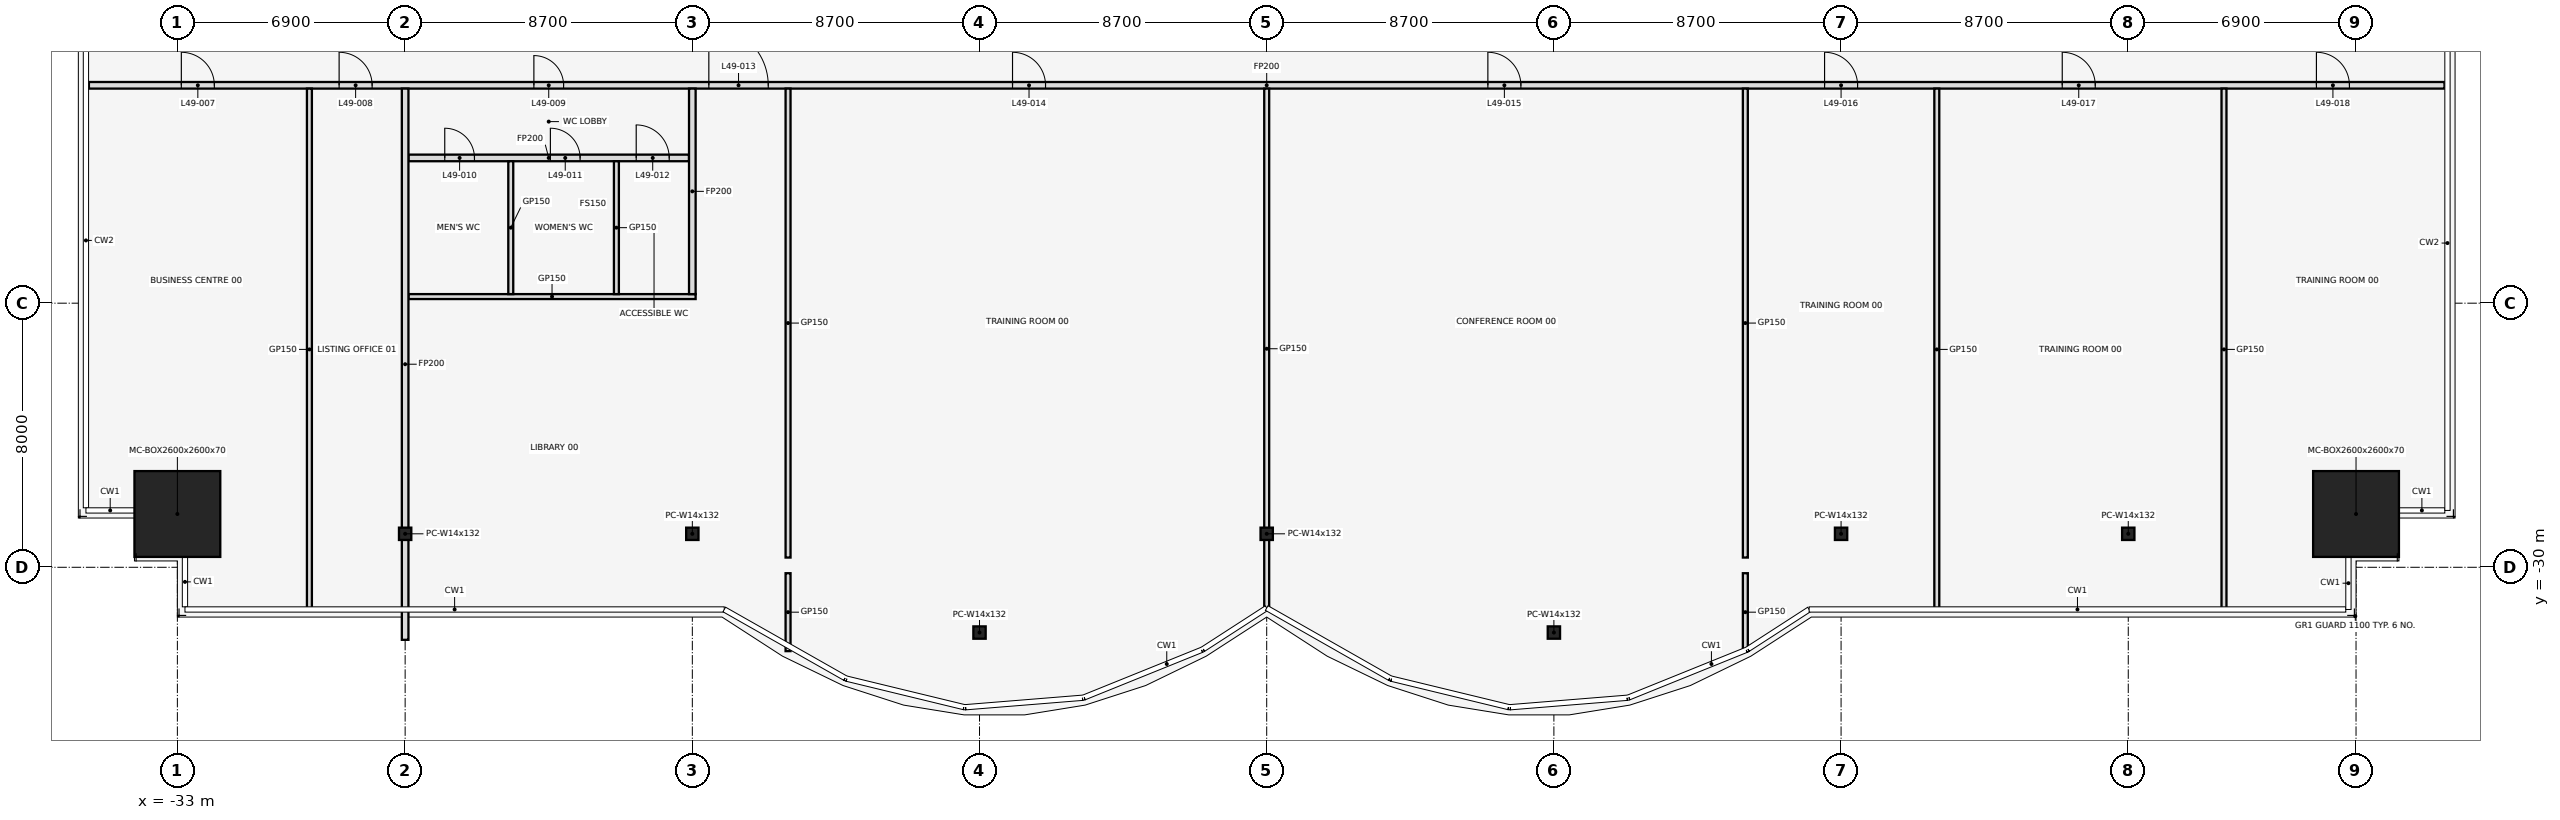
"""IFC4 building model, lengths in metres.
Left out: names, types, materials, properties, quantities, classifications, styles, units other than length and angle.
Written with IfcOpenShell. Run it as: python <this file> out.ifc"""

import sys

from ifc_helpers import new_model, si_unit, direction, frame, frame_2d, origin, origin_2d, place, context, subcontext, project, spatial, rectangle, hollow_rectangle, i_section, extrude, element, fill, save


model = new_model("IFC4")
c1 = context("Model", 3, precision=1e-05, world=origin(), true_north=direction((0.0, 1.0)))
c2 = subcontext(c1, "Body", "Model", "MODEL_VIEW")
j1 = project(units=[si_unit("LENGTHUNIT", "METRE"), si_unit("PLANEANGLEUNIT", "RADIAN")], contexts=[c1])
p1 = place(None, origin())
s1 = spatial("IfcSite", under=j1, at=p1, CompositionType="ELEMENT")
p2 = place(p1, origin())
s2 = spatial("IfcBuilding", under=s1, at=p2, CompositionType="ELEMENT")
p3 = place(p2, frame((0.0, 0.0, 219.6)))
s3 = spatial("IfcBuildingStorey", under=s2, at=p3, CompositionType="ELEMENT", Elevation=219.6)
p4 = place(p3, frame((-33.0, -28.386, 0.0), z_axis=(0.0, 0.0, 1.0), x_axis=(1.0, 0.0, 0.0)))
e1 = element("IfcColumn", 1, at=p4, inside=s3, PredefinedType="COLUMN", context=c2, shape_type="SweptSolid", body=[
    extrude(hollow_rectangle(XDim=2.6, YDim=2.6, WallThickness=0.07, at=origin_2d()), origin(), (0.0, 0.0, 1.0), 4.1),
])
for number, where, z_axis, x_axis in (
    (2, (-26.1, -28.986, 0.0), (0.0, 0.0, 1.0), (1.0, 0.0, 0.0)),
    (3, (-17.4, -28.986, 0.0), (0.0, 0.0, 1.0), (1.0, 0.0, 0.0)),
    (4, (-8.7, -31.977, 0.0), (0.0, 0.0, 1.0), (1.0, 0.0, 0.0)),
    (5, (0.0, -28.986, 0.0), (0.0, 0.0, 1.0), (1.0, 0.0, 0.0)),
    (6, (8.7, -31.977, 0.0), (0.0, 0.0, 1.0), (1.0, 0.0, 0.0)),
    (7, (17.4, -28.986, 0.0), (0.0, 0.0, 1.0), (1.0, 0.0, 0.0)),
    (8, (26.1, -28.986, 0.0), (0.0, 0.0, 1.0), (1.0, 0.0, 0.0)),
):
    element("IfcColumn", number, at=place(p3, frame(where, z_axis=z_axis, x_axis=x_axis)), inside=s3, PredefinedType="COLUMN", context=c2, shape_type="SweptSolid", body=[
        extrude(i_section(OverallWidth=0.373, OverallDepth=0.373, WebThickness=0.016, FlangeThickness=0.026, at=origin_2d()), origin(), (0.0, 0.0, 1.0), 4.1),
    ])
p5 = place(p3, frame((33.0, -28.386, 0.0), z_axis=(0.0, 0.0, 1.0), x_axis=(1.0, 0.0, 0.0)))
e9 = element("IfcColumn", 9, at=p5, inside=s3, PredefinedType="COLUMN", context=c2, shape_type="SweptSolid", body=[
    extrude(hollow_rectangle(XDim=2.6, YDim=2.6, WallThickness=0.07, at=origin_2d()), origin(), (0.0, 0.0, 1.0), 4.1),
])
p6 = place(p3, frame((-26.0, -21.8, 0.0), z_axis=(0.0, 0.0, 1.0), x_axis=(1.0, 0.0, 0.0)))
e10 = element("IfcWall", 10, at=p6, inside=s3, PredefinedType="PARTITIONING", context=c2, shape_type="SweptSolid", body=[
    extrude(rectangle(XDim=8.7, YDim=0.15, at=frame_2d((4.35, 0.0))), origin(), (0.0, 0.0, 1.0), 2.84),
])
p7 = place(p3, frame((-26.0, -17.6, 0.0), z_axis=(0.0, 0.0, 1.0), x_axis=(1.0, 0.0, 0.0)))
e11 = element("IfcWall", 11, at=p7, inside=s3, PredefinedType="PARTITIONING", context=c2, shape_type="SweptSolid", body=[
    extrude(rectangle(XDim=8.5, YDim=0.2, at=frame_2d((4.25, 0.0))), origin(), (0.0, 0.0, 1.0), 2.84),
])
p8 = place(p7, frame((1.1, 0.0, 0.0)))
e12 = element("IfcOpeningElement", 12, at=p8, cuts=e11, PredefinedType="OPENING", context=c2, shape_type="SweptSolid", body=[
    extrude(rectangle(XDim=0.9, YDim=2.1, at=frame_2d((0.45, 1.05))), frame((0.0, 0.112, 0.0), z_axis=(0.0, -1.0, 0.0), x_axis=(1.0, 0.0, 0.0)), (0.0, 0.0, 1.0), 0.224),
])
p9 = place(p7, frame((4.3, 0.0, 0.0)))
e13 = element("IfcOpeningElement", 13, at=p9, cuts=e11, PredefinedType="OPENING", context=c2, shape_type="SweptSolid", body=[
    extrude(rectangle(XDim=0.9, YDim=2.1, at=frame_2d((0.45, 1.05))), frame((0.0, 0.112, 0.0), z_axis=(0.0, -1.0, 0.0), x_axis=(1.0, 0.0, 0.0)), (0.0, 0.0, 1.0), 0.224),
])
p10 = place(p7, frame((6.9, 0.0, 0.0)))
e14 = element("IfcOpeningElement", 14, at=p10, cuts=e11, PredefinedType="OPENING", context=c2, shape_type="SweptSolid", body=[
    extrude(rectangle(XDim=1.0, YDim=2.1, at=frame_2d((0.5, 1.05))), frame((0.0, 0.112, 0.0), z_axis=(0.0, -1.0, 0.0), x_axis=(1.0, 0.0, 0.0)), (0.0, 0.0, 1.0), 0.224),
])
p11 = place(p3, frame((-35.68, -15.4, 0.0), z_axis=(0.0, 0.0, 1.0), x_axis=(1.0, 0.0, 0.0)))
e15 = element("IfcWall", 15, at=p11, inside=s3, PredefinedType="PARTITIONING", context=c2, shape_type="SweptSolid", body=[
    extrude(rectangle(XDim=71.36, YDim=0.2, at=frame_2d((35.68, 0.0))), origin(), (0.0, 0.0, 1.0), 2.84),
])
p12 = place(p11, frame((2.8, 0.0, 0.0)))
e16 = element("IfcOpeningElement", 16, at=p12, cuts=e15, PredefinedType="OPENING", context=c2, shape_type="SweptSolid", body=[
    extrude(rectangle(XDim=1.0, YDim=2.1, at=frame_2d((0.5, 1.05))), frame((0.0, 0.112, 0.0), z_axis=(0.0, -1.0, 0.0), x_axis=(1.0, 0.0, 0.0)), (0.0, 0.0, 1.0), 0.224),
])
p13 = place(p11, frame((7.58, 0.0, 0.0)))
e17 = element("IfcOpeningElement", 17, at=p13, cuts=e15, PredefinedType="OPENING", context=c2, shape_type="SweptSolid", body=[
    extrude(rectangle(XDim=1.0, YDim=2.1, at=frame_2d((0.5, 1.05))), frame((0.0, 0.112, 0.0), z_axis=(0.0, -1.0, 0.0), x_axis=(1.0, 0.0, 0.0)), (0.0, 0.0, 1.0), 0.224),
])
p14 = place(p11, frame((13.48, 0.0, 0.0)))
e18 = element("IfcOpeningElement", 18, at=p14, cuts=e15, PredefinedType="OPENING", context=c2, shape_type="SweptSolid", body=[
    extrude(rectangle(XDim=0.9, YDim=2.1, at=frame_2d((0.45, 1.05))), frame((0.0, 0.112, 0.0), z_axis=(0.0, -1.0, 0.0), x_axis=(1.0, 0.0, 0.0)), (0.0, 0.0, 1.0), 0.224),
])
p15 = place(p11, frame((18.78, 0.0, 0.0)))
e19 = element("IfcOpeningElement", 19, at=p15, cuts=e15, PredefinedType="OPENING", context=c2, shape_type="SweptSolid", body=[
    extrude(rectangle(XDim=1.8, YDim=2.1, at=frame_2d((0.9, 1.05))), frame((0.0, 0.112, 0.0), z_axis=(0.0, -1.0, 0.0), x_axis=(1.0, 0.0, 0.0)), (0.0, 0.0, 1.0), 0.224),
])
p16 = place(p11, frame((27.98, 0.0, 0.0)))
e20 = element("IfcOpeningElement", 20, at=p16, cuts=e15, PredefinedType="OPENING", context=c2, shape_type="SweptSolid", body=[
    extrude(rectangle(XDim=1.0, YDim=2.1, at=frame_2d((0.5, 1.05))), frame((0.0, 0.112, 0.0), z_axis=(0.0, -1.0, 0.0), x_axis=(1.0, 0.0, 0.0)), (0.0, 0.0, 1.0), 0.224),
])
p17 = place(p11, frame((42.38, 0.0, 0.0)))
e21 = element("IfcOpeningElement", 21, at=p17, cuts=e15, PredefinedType="OPENING", context=c2, shape_type="SweptSolid", body=[
    extrude(rectangle(XDim=1.0, YDim=2.1, at=frame_2d((0.5, 1.05))), frame((0.0, 0.112, 0.0), z_axis=(0.0, -1.0, 0.0), x_axis=(1.0, 0.0, 0.0)), (0.0, 0.0, 1.0), 0.224),
])
p18 = place(p11, frame((52.58, 0.0, 0.0)))
e22 = element("IfcOpeningElement", 22, at=p18, cuts=e15, PredefinedType="OPENING", context=c2, shape_type="SweptSolid", body=[
    extrude(rectangle(XDim=1.0, YDim=2.1, at=frame_2d((0.5, 1.05))), frame((0.0, 0.112, 0.0), z_axis=(0.0, -1.0, 0.0), x_axis=(1.0, 0.0, 0.0)), (0.0, 0.0, 1.0), 0.224),
])
p19 = place(p11, frame((59.78, 0.0, 0.0)))
e23 = element("IfcOpeningElement", 23, at=p19, cuts=e15, PredefinedType="OPENING", context=c2, shape_type="SweptSolid", body=[
    extrude(rectangle(XDim=1.0, YDim=2.1, at=frame_2d((0.5, 1.05))), frame((0.0, 0.112, 0.0), z_axis=(0.0, -1.0, 0.0), x_axis=(1.0, 0.0, 0.0)), (0.0, 0.0, 1.0), 0.224),
])
p20 = place(p11, frame((67.48, 0.0, 0.0)))
e24 = element("IfcOpeningElement", 24, at=p20, cuts=e15, PredefinedType="OPENING", context=c2, shape_type="SweptSolid", body=[
    extrude(rectangle(XDim=1.0, YDim=2.1, at=frame_2d((0.5, 1.05))), frame((0.0, 0.112, 0.0), z_axis=(0.0, -1.0, 0.0), x_axis=(1.0, 0.0, 0.0)), (0.0, 0.0, 1.0), 0.224),
])
p21 = place(p3, frame((-29.0, -31.3, 0.0), z_axis=(0.0, 0.0, 1.0), x_axis=(0.0, 1.0, 0.0)))
e25 = element("IfcWall", 25, at=p21, inside=s3, PredefinedType="PARTITIONING", context=c2, shape_type="SweptSolid", body=[
    extrude(rectangle(XDim=15.8, YDim=0.15, at=frame_2d((7.9, 0.0))), origin(), (0.0, 0.0, 1.0), 2.84),
])
p22 = place(p3, frame((-26.1, -32.198, 0.0), z_axis=(0.0, 0.0, 1.0), x_axis=(0.0, 1.0, 0.0)))
e26 = element("IfcWall", 26, at=p22, inside=s3, PredefinedType="PARTITIONING", context=c2, shape_type="SweptSolid", body=[
    extrude(rectangle(XDim=16.698, YDim=0.2, at=frame_2d((8.349, 0.0))), origin(), (0.0, 0.0, 1.0), 2.84),
])
for number, where, z_axis, x_axis in (
    (27, (-22.9, -21.725, 0.0), (0.0, 0.0, 1.0), (0.0, 1.0, 0.0)),
    (28, (-19.7, -21.725, 0.0), (0.0, 0.0, 1.0), (0.0, 1.0, 0.0)),
):
    element("IfcWall", number, at=place(p3, frame(where, z_axis=z_axis, x_axis=x_axis)), inside=s3, PredefinedType="PARTITIONING", context=c2, shape_type="SweptSolid", body=[
        extrude(rectangle(XDim=4.025, YDim=0.15, at=frame_2d((2.013, 0.0))), origin(), (0.0, 0.0, 1.0), 2.84),
    ])
p23 = place(p3, frame((-17.4, -21.725, 0.0), z_axis=(0.0, 0.0, 1.0), x_axis=(0.0, 1.0, 0.0)))
e29 = element("IfcWall", 29, at=p23, inside=s3, PredefinedType="PARTITIONING", context=c2, shape_type="SweptSolid", body=[
    extrude(rectangle(XDim=6.225, YDim=0.2, at=frame_2d((3.113, 0.0))), origin(), (0.0, 0.0, 1.0), 2.84),
])
p24 = place(p3, frame((-14.5, -32.54, 0.0), z_axis=(0.0, 0.0, 1.0), x_axis=(0.0, 1.0, 0.0)))
e30 = element("IfcWall", 30, at=p24, inside=s3, PredefinedType="PARTITIONING", context=c2, shape_type="SweptSolid", body=[
    extrude(rectangle(XDim=2.36, YDim=0.15, at=frame_2d((1.18, 0.0))), origin(), (0.0, 0.0, 1.0), 2.84),
])
p25 = place(p3, frame((-14.5, -29.705, 0.0), z_axis=(0.0, 0.0, 1.0), x_axis=(0.0, 1.0, 0.0)))
e31 = element("IfcWall", 31, at=p25, inside=s3, PredefinedType="PARTITIONING", context=c2, shape_type="SweptSolid", body=[
    extrude(rectangle(XDim=14.205, YDim=0.15, at=frame_2d((7.103, 0.0))), origin(), (0.0, 0.0, 1.0), 2.84),
])
p26 = place(p3, frame((0.0, -31.26, 0.0), z_axis=(0.0, 0.0, 1.0), x_axis=(0.0, 1.0, 0.0)))
e32 = element("IfcWall", 32, at=p26, inside=s3, PredefinedType="PARTITIONING", context=c2, shape_type="SweptSolid", body=[
    extrude(rectangle(XDim=15.76, YDim=0.15, at=frame_2d((7.88, 0.0))), origin(), (0.0, 0.0, 1.0), 2.84),
])
p27 = place(p3, frame((14.5, -32.54, 0.0), z_axis=(0.0, 0.0, 1.0), x_axis=(0.0, 1.0, 0.0)))
e33 = element("IfcWall", 33, at=p27, inside=s3, PredefinedType="PARTITIONING", context=c2, shape_type="SweptSolid", body=[
    extrude(rectangle(XDim=2.36, YDim=0.15, at=frame_2d((1.18, 0.0))), origin(), (0.0, 0.0, 1.0), 2.84),
])
p28 = place(p3, frame((14.5, -29.705, 0.0), z_axis=(0.0, 0.0, 1.0), x_axis=(0.0, 1.0, 0.0)))
e34 = element("IfcWall", 34, at=p28, inside=s3, PredefinedType="PARTITIONING", context=c2, shape_type="SweptSolid", body=[
    extrude(rectangle(XDim=14.205, YDim=0.15, at=frame_2d((7.103, 0.0))), origin(), (0.0, 0.0, 1.0), 2.84),
])
for number, where, z_axis, x_axis in (
    (35, (20.3, -31.3, 0.0), (0.0, 0.0, 1.0), (0.0, 1.0, 0.0)),
    (36, (29.0, -31.3, 0.0), (0.0, 0.0, 1.0), (0.0, 1.0, 0.0)),
):
    element("IfcWall", number, at=place(p3, frame(where, z_axis=z_axis, x_axis=x_axis)), inside=s3, PredefinedType="PARTITIONING", context=c2, shape_type="SweptSolid", body=[
        extrude(rectangle(XDim=15.8, YDim=0.15, at=frame_2d((7.9, 0.0))), origin(), (0.0, 0.0, 1.0), 2.84),
    ])
p29 = place(p12, frame((1.0, 0.0, 0.0), z_axis=(0.0, 0.0, 1.0), x_axis=(-1.0, 0.0, 0.0)))
e37 = element("IfcDoor", 37, at=p29, inside=s3, OperationType="SINGLE_SWING_LEFT", PredefinedType="DOOR", context=c2, shape_type="SweptSolid", body=[
    extrude(rectangle(XDim=1.0, YDim=2.1, at=frame_2d((0.5, 1.05))), frame((0.0, 0.025, 0.0), z_axis=(0.0, -1.0, 0.0), x_axis=(1.0, 0.0, 0.0)), (0.0, 0.0, 1.0), 0.05),
])
fill(e16, e37)
p30 = place(p13, frame((1.0, 0.0, 0.0), z_axis=(0.0, 0.0, 1.0), x_axis=(-1.0, 0.0, 0.0)))
e38 = element("IfcDoor", 38, at=p30, inside=s3, OperationType="SINGLE_SWING_RIGHT", PredefinedType="DOOR", context=c2, shape_type="SweptSolid", body=[
    extrude(rectangle(XDim=1.0, YDim=2.1, at=frame_2d((0.5, 1.05))), frame((0.0, 0.025, 0.0), z_axis=(0.0, -1.0, 0.0), x_axis=(1.0, 0.0, 0.0)), (0.0, 0.0, 1.0), 0.05),
])
fill(e17, e38)
p31 = place(p14, frame((0.9, 0.0, 0.0), z_axis=(0.0, 0.0, 1.0), x_axis=(-1.0, 0.0, 0.0)))
e39 = element("IfcDoor", 39, at=p31, inside=s3, OperationType="SINGLE_SWING_RIGHT", PredefinedType="DOOR", context=c2, shape_type="SweptSolid", body=[
    extrude(rectangle(XDim=0.9, YDim=2.1, at=frame_2d((0.45, 1.05))), frame((0.0, 0.025, 0.0), z_axis=(0.0, -1.0, 0.0), x_axis=(1.0, 0.0, 0.0)), (0.0, 0.0, 1.0), 0.05),
])
fill(e18, e39)
p32 = place(p8, frame((0.9, 0.0, 0.0), z_axis=(0.0, 0.0, 1.0), x_axis=(-1.0, 0.0, 0.0)))
e40 = element("IfcDoor", 40, at=p32, inside=s3, OperationType="SINGLE_SWING_LEFT", PredefinedType="DOOR", context=c2, shape_type="SweptSolid", body=[
    extrude(rectangle(XDim=0.9, YDim=2.1, at=frame_2d((0.45, 1.05))), frame((0.0, 0.025, 0.0), z_axis=(0.0, -1.0, 0.0), x_axis=(1.0, 0.0, 0.0)), (0.0, 0.0, 1.0), 0.05),
])
fill(e12, e40)
p33 = place(p9, frame((0.9, 0.0, 0.0), z_axis=(0.0, 0.0, 1.0), x_axis=(-1.0, 0.0, 0.0)))
e41 = element("IfcDoor", 41, at=p33, inside=s3, OperationType="SINGLE_SWING_RIGHT", PredefinedType="DOOR", context=c2, shape_type="SweptSolid", body=[
    extrude(rectangle(XDim=0.9, YDim=2.1, at=frame_2d((0.45, 1.05))), frame((0.0, 0.025, 0.0), z_axis=(0.0, -1.0, 0.0), x_axis=(1.0, 0.0, 0.0)), (0.0, 0.0, 1.0), 0.05),
])
fill(e13, e41)
p34 = place(p10, frame((1.0, 0.0, 0.0), z_axis=(0.0, 0.0, 1.0), x_axis=(-1.0, 0.0, 0.0)))
e42 = element("IfcDoor", 42, at=p34, inside=s3, OperationType="SINGLE_SWING_RIGHT", PredefinedType="DOOR", context=c2, shape_type="SweptSolid", body=[
    extrude(rectangle(XDim=1.0, YDim=2.1, at=frame_2d((0.5, 1.05))), frame((0.0, 0.025, 0.0), z_axis=(0.0, -1.0, 0.0), x_axis=(1.0, 0.0, 0.0)), (0.0, 0.0, 1.0), 0.05),
])
fill(e14, e42)
p35 = place(p15, origin())
e43 = element("IfcDoor", 43, at=p35, inside=s3, OperationType="SINGLE_SWING_LEFT", PredefinedType="DOOR", context=c2, shape_type="SweptSolid", body=[
    extrude(rectangle(XDim=1.8, YDim=2.1, at=frame_2d((0.9, 1.05))), frame((0.0, 0.025, 0.0), z_axis=(0.0, -1.0, 0.0), x_axis=(1.0, 0.0, 0.0)), (0.0, 0.0, 1.0), 0.05),
])
fill(e19, e43)
p36 = place(p16, frame((1.0, 0.0, 0.0), z_axis=(0.0, 0.0, 1.0), x_axis=(-1.0, 0.0, 0.0)))
e44 = element("IfcDoor", 44, at=p36, inside=s3, OperationType="SINGLE_SWING_RIGHT", PredefinedType="DOOR", context=c2, shape_type="SweptSolid", body=[
    extrude(rectangle(XDim=1.0, YDim=2.1, at=frame_2d((0.5, 1.05))), frame((0.0, 0.025, 0.0), z_axis=(0.0, -1.0, 0.0), x_axis=(1.0, 0.0, 0.0)), (0.0, 0.0, 1.0), 0.05),
])
fill(e20, e44)
p37 = place(p17, frame((1.0, 0.0, 0.0), z_axis=(0.0, 0.0, 1.0), x_axis=(-1.0, 0.0, 0.0)))
e45 = element("IfcDoor", 45, at=p37, inside=s3, OperationType="SINGLE_SWING_RIGHT", PredefinedType="DOOR", context=c2, shape_type="SweptSolid", body=[
    extrude(rectangle(XDim=1.0, YDim=2.1, at=frame_2d((0.5, 1.05))), frame((0.0, 0.025, 0.0), z_axis=(0.0, -1.0, 0.0), x_axis=(1.0, 0.0, 0.0)), (0.0, 0.0, 1.0), 0.05),
])
fill(e21, e45)
p38 = place(p18, frame((1.0, 0.0, 0.0), z_axis=(0.0, 0.0, 1.0), x_axis=(-1.0, 0.0, 0.0)))
e46 = element("IfcDoor", 46, at=p38, inside=s3, OperationType="SINGLE_SWING_LEFT", PredefinedType="DOOR", context=c2, shape_type="SweptSolid", body=[
    extrude(rectangle(XDim=1.0, YDim=2.1, at=frame_2d((0.5, 1.05))), frame((0.0, 0.025, 0.0), z_axis=(0.0, -1.0, 0.0), x_axis=(1.0, 0.0, 0.0)), (0.0, 0.0, 1.0), 0.05),
])
fill(e22, e46)
p39 = place(p19, frame((1.0, 0.0, 0.0), z_axis=(0.0, 0.0, 1.0), x_axis=(-1.0, 0.0, 0.0)))
e47 = element("IfcDoor", 47, at=p39, inside=s3, OperationType="SINGLE_SWING_RIGHT", PredefinedType="DOOR", context=c2, shape_type="SweptSolid", body=[
    extrude(rectangle(XDim=1.0, YDim=2.1, at=frame_2d((0.5, 1.05))), frame((0.0, 0.025, 0.0), z_axis=(0.0, -1.0, 0.0), x_axis=(1.0, 0.0, 0.0)), (0.0, 0.0, 1.0), 0.05),
])
fill(e23, e47)
p40 = place(p20, frame((1.0, 0.0, 0.0), z_axis=(0.0, 0.0, 1.0), x_axis=(-1.0, 0.0, 0.0)))
e48 = element("IfcDoor", 48, at=p40, inside=s3, OperationType="SINGLE_SWING_RIGHT", PredefinedType="DOOR", context=c2, shape_type="SweptSolid", body=[
    extrude(rectangle(XDim=1.0, YDim=2.1, at=frame_2d((0.5, 1.05))), frame((0.0, 0.025, 0.0), z_axis=(0.0, -1.0, 0.0), x_axis=(1.0, 0.0, 0.0)), (0.0, 0.0, 1.0), 0.05),
])
fill(e24, e48)
save(model, sys.argv[1])
